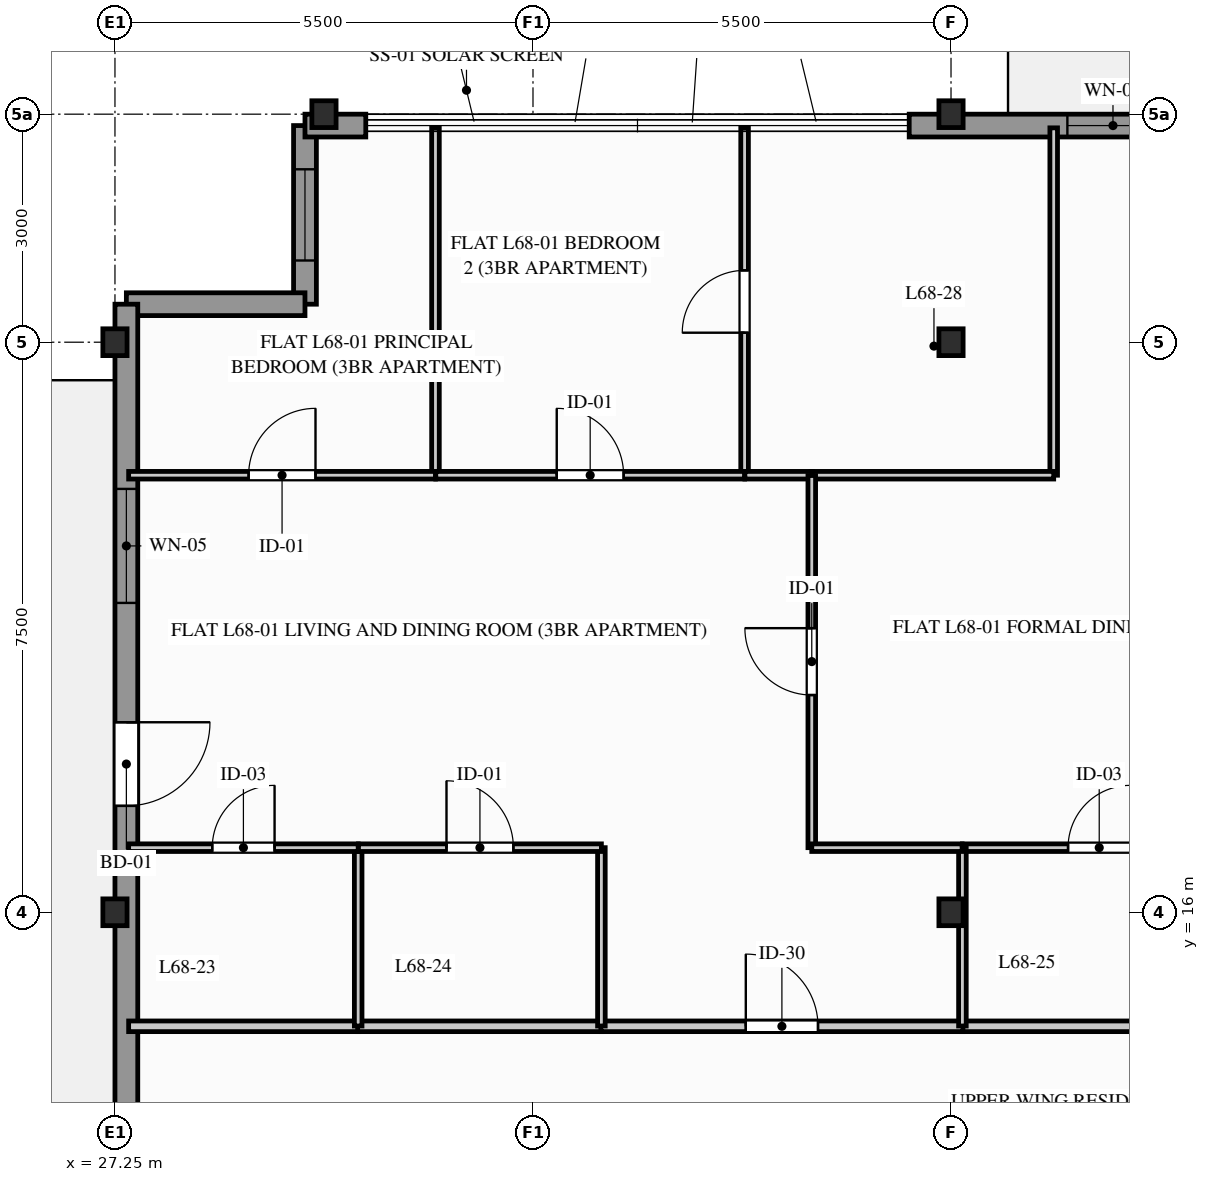
"""IFC4 building model, lengths in metres.
Left out: names, types, materials, properties, quantities, classifications, styles, units other than length and angle.
Written with IfcOpenShell. Run it as: python <this file> out.ifc"""

import sys

from ifc_helpers import new_model, si_unit, direction, frame, frame_2d, origin, origin_2d, place, context, subcontext, project, spatial, rectangle, i_section, extrude, element, fill, save


model = new_model("IFC4")
c1 = context("Model", 3, precision=1e-05, world=origin(), true_north=direction((0.0, 1.0)))
c2 = subcontext(c1, "Body", "Model", "MODEL_VIEW")
j1 = project(units=[si_unit("LENGTHUNIT", "METRE"), si_unit("PLANEANGLEUNIT", "RADIAN")], contexts=[c1])
p1 = place(None, origin())
s1 = spatial("IfcSite", under=j1, at=p1, CompositionType="ELEMENT")
p2 = place(p1, origin())
s2 = spatial("IfcBuilding", under=s1, at=p2, CompositionType="ELEMENT")
p3 = place(p2, frame((0.0, 0.0, 224.2)))
s3 = spatial("IfcBuildingStorey", under=s2, at=p3, CompositionType="ELEMENT", Elevation=224.2)
for number, where, z_axis, x_axis in (
    (1, (27.25, 16.0, 0.0), (0.0, 0.0, 1.0), (1.0, 0.0, 0.0)),
    (2, (27.25, 23.5, 0.0), (0.0, 0.0, 1.0), (1.0, 0.0, 0.0)),
    (3, (30.0, 26.5, 0.0), (0.0, 0.0, 1.0), (1.0, 0.0, 0.0)),
    (4, (38.25, 16.0, 0.0), (0.0, 0.0, 1.0), (1.0, 0.0, 0.0)),
    (5, (38.25, 23.5, 0.0), (0.0, 0.0, 1.0), (1.0, 0.0, 0.0)),
    (6, (38.25, 26.5, 0.0), (0.0, 0.0, 1.0), (1.0, 0.0, 0.0)),
):
    element("IfcColumn", number, at=place(p3, frame(where, z_axis=z_axis, x_axis=x_axis)), inside=s3, PredefinedType="COLUMN", context=c2, shape_type="SweptSolid", body=[
        extrude(i_section(OverallWidth=0.318, OverallDepth=0.353, WebThickness=0.023, FlangeThickness=0.038, FilletRadius=0.015, at=origin_2d()), origin(), (0.0, 0.0, 1.0), 3.1),
    ])
p4 = place(p3, frame((29.75, 26.35, 0.0), z_axis=(0.0, 0.0, 1.0), x_axis=(0.0, -1.0, 0.0)))
e7 = element("IfcWall", 7, at=p4, inside=s3, PredefinedType="STANDARD", context=c2, shape_type="SweptSolid", body=[
    extrude(rectangle(XDim=2.35, YDim=0.3, at=frame_2d((1.175, 0.0))), origin(), (0.0, 0.0, 1.0), 2.89),
])
p5 = place(p4, frame((0.575, 0.0, 0.95)))
e8 = element("IfcOpeningElement", 8, at=p5, cuts=e7, PredefinedType="OPENING", context=c2, shape_type="SweptSolid", body=[
    extrude(rectangle(XDim=1.2, YDim=1.6, at=frame_2d((0.6, 0.8))), frame((0.0, 0.16, 0.0), z_axis=(0.0, -1.0, 0.0), x_axis=(1.0, 0.0, 0.0)), (0.0, 0.0, 1.0), 0.32),
])
p6 = place(p3, frame((29.75, 24.0, 0.0), z_axis=(0.0, 0.0, 1.0), x_axis=(-1.0, 0.0, 0.0)))
e9 = element("IfcWall", 9, at=p6, inside=s3, PredefinedType="STANDARD", context=c2, shape_type="SweptSolid", body=[
    extrude(rectangle(XDim=2.35, YDim=0.3, at=frame_2d((1.175, 0.0))), origin(), (0.0, 0.0, 1.0), 2.89),
])
p7 = place(p3, frame((29.75, 26.35, 0.0), z_axis=(0.0, 0.0, 1.0), x_axis=(1.0, 0.0, 0.0)))
e10 = element("IfcWall", 10, at=p7, inside=s3, PredefinedType="STANDARD", context=c2, shape_type="SweptSolid", body=[
    extrude(rectangle(XDim=0.8, YDim=0.3, at=frame_2d((0.4, 0.0))), origin(), (0.0, 0.0, 1.0), 2.89),
])
p8 = place(p3, frame((37.7, 26.35, 0.0), z_axis=(0.0, 0.0, 1.0), x_axis=(1.0, 0.0, 0.0)))
e11 = element("IfcWall", 11, at=p8, inside=s3, PredefinedType="STANDARD", context=c2, shape_type="SweptSolid", body=[
    extrude(rectangle(XDim=10.85, YDim=0.3, at=frame_2d((5.425, 0.0))), origin(), (0.0, 0.0, 1.0), 2.332),
])
p9 = place(p8, frame((5.475, 0.0, 0.0)))
e12 = element("IfcOpeningElement", 12, at=p9, cuts=e11, PredefinedType="OPENING", context=c2, shape_type="SweptSolid", body=[
    extrude(rectangle(XDim=1.25, YDim=2.2, at=frame_2d((0.625, 1.1))), frame((0.0, 0.16, 0.0), z_axis=(0.0, -1.0, 0.0), x_axis=(1.0, 0.0, 0.0)), (0.0, 0.0, 1.0), 0.32),
])
p10 = place(p8, frame((2.081, 0.0, 0.512)))
e13 = element("IfcOpeningElement", 13, at=p10, cuts=e11, PredefinedType="OPENING", context=c2, shape_type="SweptSolid", body=[
    extrude(rectangle(XDim=1.2, YDim=1.6, at=frame_2d((0.6, 0.8))), frame((0.0, 0.16, 0.0), z_axis=(0.0, -1.0, 0.0), x_axis=(1.0, 0.0, 0.0)), (0.0, 0.0, 1.0), 0.32),
])
p11 = place(p3, frame((27.4, 24.0, 0.0), z_axis=(0.0, 0.0, 1.0), x_axis=(0.0, -1.0, 0.0)))
e14 = element("IfcWall", 14, at=p11, inside=s3, PredefinedType="STANDARD", context=c2, shape_type="SweptSolid", body=[
    extrude(rectangle(XDim=21.5, YDim=0.3, at=frame_2d((10.75, 0.0))), origin(), (0.0, 0.0, 1.0), 2.332),
])
p12 = place(p11, frame((5.5, 0.0, 0.0)))
e15 = element("IfcOpeningElement", 15, at=p12, cuts=e14, PredefinedType="OPENING", context=c2, shape_type="SweptSolid", body=[
    extrude(rectangle(XDim=1.1, YDim=2.2, at=frame_2d((0.55, 1.1))), frame((0.0, 0.16, 0.0), z_axis=(0.0, -1.0, 0.0), x_axis=(1.0, 0.0, 0.0)), (0.0, 0.0, 1.0), 0.32),
])
p13 = place(p11, frame((2.43, 0.0, 0.312)))
e16 = element("IfcOpeningElement", 16, at=p13, cuts=e14, PredefinedType="OPENING", context=c2, shape_type="SweptSolid", body=[
    extrude(rectangle(XDim=1.5, YDim=1.8, at=frame_2d((0.75, 0.9))), frame((0.0, 0.16, 0.0), z_axis=(0.0, -1.0, 0.0), x_axis=(1.0, 0.0, 0.0)), (0.0, 0.0, 1.0), 0.32),
])
p14 = place(p3, frame((27.43, 14.5, 0.0), z_axis=(0.0, 0.0, 1.0), x_axis=(1.0, 0.0, 0.0)))
e17 = element("IfcWall", 17, at=p14, inside=s3, PredefinedType="PARTITIONING", context=c2, shape_type="SweptSolid", body=[
    extrude(rectangle(XDim=3.031, YDim=0.14, at=frame_2d((1.516, 0.0))), origin(), (0.0, 0.0, 1.0), 2.89),
])
p15 = place(p3, frame((30.443, 14.5, 0.0), z_axis=(0.0, 0.0, 1.0), x_axis=(1.0, 0.0, 0.0)))
e18 = element("IfcWall", 18, at=p15, inside=s3, PredefinedType="PARTITIONING", context=c2, shape_type="SweptSolid", body=[
    extrude(rectangle(XDim=3.219, YDim=0.14, at=frame_2d((1.609, 0.0))), origin(), (0.0, 0.0, 1.0), 2.89),
])
p16 = place(p3, frame((38.389, 14.5, 0.0), z_axis=(0.0, 0.0, 1.0), x_axis=(1.0, 0.0, 0.0)))
e19 = element("IfcWall", 19, at=p16, inside=s3, PredefinedType="PARTITIONING", context=c2, shape_type="SweptSolid", body=[
    extrude(rectangle(XDim=3.623, YDim=0.14, at=frame_2d((1.811, 0.0))), origin(), (0.0, 0.0, 1.0), 2.325),
])
p17 = place(p3, frame((33.643, 14.5, 0.0), z_axis=(0.0, 0.0, 1.0), x_axis=(1.0, 0.0, 0.0)))
e20 = element("IfcWall", 20, at=p17, inside=s3, PredefinedType="PARTITIONING", context=c2, shape_type="SweptSolid", body=[
    extrude(rectangle(XDim=4.765, YDim=0.14, at=frame_2d((2.382, 0.0))), origin(), (0.0, 0.0, 1.0), 2.325),
])
p18 = place(p17, frame((1.907, 0.0, 0.0)))
e21 = element("IfcOpeningElement", 21, at=p18, cuts=e20, PredefinedType="OPENING", context=c2, shape_type="SweptSolid", body=[
    extrude(rectangle(XDim=0.95, YDim=2.05, at=frame_2d((0.475, 1.025))), frame((0.0, 0.08, 0.0), z_axis=(0.0, -1.0, 0.0), x_axis=(1.0, 0.0, 0.0)), (0.0, 0.0, 1.0), 0.16),
])
p19 = place(p3, frame((30.45, 14.504, 0.0), z_axis=(0.0, 0.0, 1.0), x_axis=(0.0, 1.0, 0.0)))
e22 = element("IfcWall", 22, at=p19, inside=s3, PredefinedType="PARTITIONING", context=c2, shape_type="SweptSolid", body=[
    extrude(rectangle(XDim=2.346, YDim=0.1, at=frame_2d((1.173, 0.0))), origin(), (0.0, 0.0, 1.0), 2.325),
])
p20 = place(p3, frame((27.43, 16.85, 0.0), z_axis=(0.0, 0.0, 1.0), x_axis=(1.0, 0.0, 0.0)))
e23 = element("IfcWall", 23, at=p20, inside=s3, PredefinedType="PARTITIONING", context=c2, shape_type="SweptSolid", body=[
    extrude(rectangle(XDim=3.02, YDim=0.1, at=frame_2d((1.51, 0.0))), origin(), (0.0, 0.0, 1.0), 2.89),
])
p21 = place(p20, frame((1.1, 0.0, 0.0)))
e24 = element("IfcOpeningElement", 24, at=p21, cuts=e23, PredefinedType="OPENING", context=c2, shape_type="SweptSolid", body=[
    extrude(rectangle(XDim=0.82, YDim=2.02, at=frame_2d((0.41, 1.01))), frame((0.0, 0.06, 0.0), z_axis=(0.0, -1.0, 0.0), x_axis=(1.0, 0.0, 0.0)), (0.0, 0.0, 1.0), 0.12),
])
p22 = place(p3, frame((33.65, 14.504, 0.0), z_axis=(0.0, 0.0, 1.0), x_axis=(0.0, 1.0, 0.0)))
e25 = element("IfcWall", 25, at=p22, inside=s3, PredefinedType="PARTITIONING", context=c2, shape_type="SweptSolid", body=[
    extrude(rectangle(XDim=2.346, YDim=0.1, at=frame_2d((1.173, 0.0))), origin(), (0.0, 0.0, 1.0), 2.325),
])
p23 = place(p3, frame((30.454, 16.85, 0.0), z_axis=(0.0, 0.0, 1.0), x_axis=(1.0, 0.0, 0.0)))
e26 = element("IfcWall", 26, at=p23, inside=s3, PredefinedType="PARTITIONING", context=c2, shape_type="SweptSolid", body=[
    extrude(rectangle(XDim=3.196, YDim=0.1, at=frame_2d((1.598, 0.0))), origin(), (0.0, 0.0, 1.0), 2.89),
])
p24 = place(p23, frame((1.158, 0.0, 0.0)))
e27 = element("IfcOpeningElement", 27, at=p24, cuts=e26, PredefinedType="OPENING", context=c2, shape_type="SweptSolid", body=[
    extrude(rectangle(XDim=0.88, YDim=2.04, at=frame_2d((0.44, 1.02))), frame((0.0, 0.06, 0.0), z_axis=(0.0, -1.0, 0.0), x_axis=(1.0, 0.0, 0.0)), (0.0, 0.0, 1.0), 0.12),
])
p25 = place(p3, frame((38.4, 16.85, 0.0), z_axis=(0.0, 0.0, 1.0), x_axis=(1.0, 0.0, 0.0)))
e28 = element("IfcWall", 28, at=p25, inside=s3, PredefinedType="PARTITIONING", context=c2, shape_type="SweptSolid", body=[
    extrude(rectangle(XDim=3.6, YDim=0.1, at=frame_2d((1.8, 0.0))), origin(), (0.0, 0.0, 1.0), 2.325),
])
p26 = place(p25, frame((1.39, 0.0, 0.0)))
e29 = element("IfcOpeningElement", 29, at=p26, cuts=e28, PredefinedType="OPENING", context=c2, shape_type="SweptSolid", body=[
    extrude(rectangle(XDim=0.82, YDim=2.02, at=frame_2d((0.41, 1.01))), frame((0.0, 0.06, 0.0), z_axis=(0.0, -1.0, 0.0), x_axis=(1.0, 0.0, 0.0)), (0.0, 0.0, 1.0), 0.12),
])
p27 = place(p3, frame((38.4, 14.504, 0.0), z_axis=(0.0, 0.0, 1.0), x_axis=(0.0, 1.0, 0.0)))
e30 = element("IfcWall", 30, at=p27, inside=s3, PredefinedType="PARTITIONING", context=c2, shape_type="SweptSolid", body=[
    extrude(rectangle(XDim=2.346, YDim=0.1, at=frame_2d((1.173, 0.0))), origin(), (0.0, 0.0, 1.0), 2.325),
])
p28 = place(p3, frame((31.467, 21.75, 0.0), z_axis=(0.0, 0.0, 1.0), x_axis=(0.0, 1.0, 0.0)))
e31 = element("IfcWall", 31, at=p28, inside=s3, PredefinedType="PARTITIONING", context=c2, shape_type="SweptSolid", body=[
    extrude(rectangle(XDim=4.57, YDim=0.1, at=frame_2d((2.285, 0.0))), origin(), (0.0, 0.0, 1.0), 2.325),
])
p29 = place(p3, frame((27.43, 21.75, 0.0), z_axis=(0.0, 0.0, 1.0), x_axis=(1.0, 0.0, 0.0)))
e32 = element("IfcWall", 32, at=p29, inside=s3, PredefinedType="PARTITIONING", context=c2, shape_type="SweptSolid", body=[
    extrude(rectangle(XDim=4.037, YDim=0.1, at=frame_2d((2.019, 0.0))), origin(), (0.0, 0.0, 1.0), 2.89),
])
p30 = place(p29, frame((1.579, 0.0, 0.0)))
e33 = element("IfcOpeningElement", 33, at=p30, cuts=e32, PredefinedType="OPENING", context=c2, shape_type="SweptSolid", body=[
    extrude(rectangle(XDim=0.88, YDim=2.04, at=frame_2d((0.44, 1.02))), frame((0.0, 0.06, 0.0), z_axis=(0.0, -1.0, 0.0), x_axis=(1.0, 0.0, 0.0)), (0.0, 0.0, 1.0), 0.12),
])
p31 = place(p3, frame((35.534, 21.75, 0.0), z_axis=(0.0, 0.0, 1.0), x_axis=(0.0, 1.0, 0.0)))
e34 = element("IfcWall", 34, at=p31, inside=s3, PredefinedType="PARTITIONING", context=c2, shape_type="SweptSolid", body=[
    extrude(rectangle(XDim=4.57, YDim=0.1, at=frame_2d((2.285, 0.0))), origin(), (0.0, 0.0, 1.0), 2.325),
])
p32 = place(p31, frame((1.875, 0.0, 0.0)))
e35 = element("IfcOpeningElement", 35, at=p32, cuts=e34, PredefinedType="OPENING", context=c2, shape_type="SweptSolid", body=[
    extrude(rectangle(XDim=0.82, YDim=2.02, at=frame_2d((0.41, 1.01))), frame((0.0, 0.06, 0.0), z_axis=(0.0, -1.0, 0.0), x_axis=(1.0, 0.0, 0.0)), (0.0, 0.0, 1.0), 0.12),
])
p33 = place(p3, frame((31.471, 21.75, 0.0), z_axis=(0.0, 0.0, 1.0), x_axis=(1.0, 0.0, 0.0)))
e36 = element("IfcWall", 36, at=p33, inside=s3, PredefinedType="PARTITIONING", context=c2, shape_type="SweptSolid", body=[
    extrude(rectangle(XDim=4.063, YDim=0.1, at=frame_2d((2.031, 0.0))), origin(), (0.0, 0.0, 1.0), 2.89),
])
p34 = place(p33, frame((1.592, 0.0, 0.0)))
e37 = element("IfcOpeningElement", 37, at=p34, cuts=e36, PredefinedType="OPENING", context=c2, shape_type="SweptSolid", body=[
    extrude(rectangle(XDim=0.88, YDim=2.04, at=frame_2d((0.44, 1.02))), frame((0.0, 0.06, 0.0), z_axis=(0.0, -1.0, 0.0), x_axis=(1.0, 0.0, 0.0)), (0.0, 0.0, 1.0), 0.12),
])
p35 = place(p3, frame((39.601, 21.75, 0.0), z_axis=(0.0, 0.0, 1.0), x_axis=(0.0, 1.0, 0.0)))
e38 = element("IfcWall", 38, at=p35, inside=s3, PredefinedType="PARTITIONING", context=c2, shape_type="SweptSolid", body=[
    extrude(rectangle(XDim=4.57, YDim=0.1, at=frame_2d((2.285, 0.0))), origin(), (0.0, 0.0, 1.0), 2.325),
])
p36 = place(p3, frame((36.407, 21.75, 0.0), z_axis=(0.0, 0.0, 1.0), x_axis=(1.0, 0.0, 0.0)))
e39 = element("IfcWall", 39, at=p36, inside=s3, PredefinedType="PARTITIONING", context=c2, shape_type="SweptSolid", body=[
    extrude(rectangle(XDim=3.194, YDim=0.1, at=frame_2d((1.597, 0.0))), origin(), (0.0, 0.0, 1.0), 2.325),
])
p37 = place(p3, frame((35.538, 21.75, 0.0), z_axis=(0.0, 0.0, 1.0), x_axis=(1.0, 0.0, 0.0)))
e40 = element("IfcWall", 40, at=p37, inside=s3, PredefinedType="PARTITIONING", context=c2, shape_type="SweptSolid", body=[
    extrude(rectangle(XDim=0.887, YDim=0.1, at=frame_2d((0.444, 0.0))), origin(), (0.0, 0.0, 1.0), 2.89),
])
p38 = place(p3, frame((36.418, 16.85, 0.0), z_axis=(0.0, 0.0, 1.0), x_axis=(0.0, 1.0, 0.0)))
e41 = element("IfcWall", 41, at=p38, inside=s3, PredefinedType="PARTITIONING", context=c2, shape_type="SweptSolid", body=[
    extrude(rectangle(XDim=4.896, YDim=0.1, at=frame_2d((2.448, 0.0))), origin(), (0.0, 0.0, 1.0), 2.614),
])
p39 = place(p38, frame((2.008, 0.0, 0.0)))
e42 = element("IfcOpeningElement", 42, at=p39, cuts=e41, PredefinedType="OPENING", context=c2, shape_type="SweptSolid", body=[
    extrude(rectangle(XDim=0.88, YDim=2.04, at=frame_2d((0.44, 1.02))), frame((0.0, 0.06, 0.0), z_axis=(0.0, -1.0, 0.0), x_axis=(1.0, 0.0, 0.0)), (0.0, 0.0, 1.0), 0.12),
])
p40 = place(p3, frame((36.418, 16.85, 0.0), z_axis=(0.0, 0.0, 1.0), x_axis=(1.0, 0.0, 0.0)))
e43 = element("IfcWall", 43, at=p40, inside=s3, PredefinedType="PARTITIONING", context=c2, shape_type="SweptSolid", body=[
    extrude(rectangle(XDim=1.978, YDim=0.1, at=frame_2d((0.989, 0.0))), origin(), (0.0, 0.0, 1.0), 2.325),
])
p41 = place(p10, origin())
e44 = element("IfcWindow", 44, at=p41, inside=s3, PartitioningType="SINGLE_PANEL", PredefinedType="WINDOW", context=c2, shape_type="SweptSolid", body=[
    extrude(rectangle(XDim=1.2, YDim=1.6, at=frame_2d((0.6, 0.8))), frame((0.0, 0.03, 0.0), z_axis=(0.0, -1.0, 0.0), x_axis=(1.0, 0.0, 0.0)), (0.0, 0.0, 1.0), 0.06),
])
fill(e13, e44)
p42 = place(p12, origin())
e45 = element("IfcDoor", 45, at=p42, inside=s3, OperationType="SINGLE_SWING_LEFT", PredefinedType="DOOR", context=c2, shape_type="SweptSolid", body=[
    extrude(rectangle(XDim=1.1, YDim=2.2, at=frame_2d((0.55, 1.1))), frame((0.0, 0.025, 0.0), z_axis=(0.0, -1.0, 0.0), x_axis=(1.0, 0.0, 0.0)), (0.0, 0.0, 1.0), 0.05),
])
fill(e15, e45)
p43 = place(p13, origin())
e46 = element("IfcWindow", 46, at=p43, inside=s3, PartitioningType="SINGLE_PANEL", PredefinedType="WINDOW", context=c2, shape_type="SweptSolid", body=[
    extrude(rectangle(XDim=1.5, YDim=1.8, at=frame_2d((0.75, 0.9))), frame((0.0, 0.03, 0.0), z_axis=(0.0, -1.0, 0.0), x_axis=(1.0, 0.0, 0.0)), (0.0, 0.0, 1.0), 0.06),
])
fill(e16, e46)
p44 = place(p18, origin())
e47 = element("IfcDoor", 47, at=p44, inside=s3, OperationType="SINGLE_SWING_LEFT", PredefinedType="DOOR", context=c2, shape_type="SweptSolid", body=[
    extrude(rectangle(XDim=0.95, YDim=2.05, at=frame_2d((0.475, 1.025))), frame((0.0, 0.025, 0.0), z_axis=(0.0, -1.0, 0.0), x_axis=(1.0, 0.0, 0.0)), (0.0, 0.0, 1.0), 0.05),
])
fill(e21, e47)
p45 = place(p21, origin())
e48 = element("IfcDoor", 48, at=p45, inside=s3, OperationType="SINGLE_SWING_RIGHT", PredefinedType="DOOR", context=c2, shape_type="SweptSolid", body=[
    extrude(rectangle(XDim=0.82, YDim=2.02, at=frame_2d((0.41, 1.01))), frame((0.0, 0.025, 0.0), z_axis=(0.0, -1.0, 0.0), x_axis=(1.0, 0.0, 0.0)), (0.0, 0.0, 1.0), 0.05),
])
fill(e24, e48)
p46 = place(p24, origin())
e49 = element("IfcDoor", 49, at=p46, inside=s3, OperationType="SINGLE_SWING_LEFT", PredefinedType="DOOR", context=c2, shape_type="SweptSolid", body=[
    extrude(rectangle(XDim=0.88, YDim=2.04, at=frame_2d((0.44, 1.02))), frame((0.0, 0.025, 0.0), z_axis=(0.0, -1.0, 0.0), x_axis=(1.0, 0.0, 0.0)), (0.0, 0.0, 1.0), 0.05),
])
fill(e27, e49)
p47 = place(p30, origin())
e50 = element("IfcDoor", 50, at=p47, inside=s3, OperationType="SINGLE_SWING_RIGHT", PredefinedType="DOOR", context=c2, shape_type="SweptSolid", body=[
    extrude(rectangle(XDim=0.88, YDim=2.04, at=frame_2d((0.44, 1.02))), frame((0.0, 0.025, 0.0), z_axis=(0.0, -1.0, 0.0), x_axis=(1.0, 0.0, 0.0)), (0.0, 0.0, 1.0), 0.05),
])
fill(e33, e50)
p48 = place(p34, origin())
e51 = element("IfcDoor", 51, at=p48, inside=s3, OperationType="SINGLE_SWING_LEFT", PredefinedType="DOOR", context=c2, shape_type="SweptSolid", body=[
    extrude(rectangle(XDim=0.88, YDim=2.04, at=frame_2d((0.44, 1.02))), frame((0.0, 0.025, 0.0), z_axis=(0.0, -1.0, 0.0), x_axis=(1.0, 0.0, 0.0)), (0.0, 0.0, 1.0), 0.05),
])
fill(e37, e51)
p49 = place(p39, origin())
e52 = element("IfcDoor", 52, at=p49, inside=s3, OperationType="SINGLE_SWING_RIGHT", PredefinedType="DOOR", context=c2, shape_type="SweptSolid", body=[
    extrude(rectangle(XDim=0.88, YDim=2.04, at=frame_2d((0.44, 1.02))), frame((0.0, 0.025, 0.0), z_axis=(0.0, -1.0, 0.0), x_axis=(1.0, 0.0, 0.0)), (0.0, 0.0, 1.0), 0.05),
])
fill(e42, e52)
p50 = place(p26, origin())
e53 = element("IfcDoor", 53, at=p50, inside=s3, OperationType="SINGLE_SWING_RIGHT", PredefinedType="DOOR", context=c2, shape_type="SweptSolid", body=[
    extrude(rectangle(XDim=0.82, YDim=2.02, at=frame_2d((0.41, 1.01))), frame((0.0, 0.025, 0.0), z_axis=(0.0, -1.0, 0.0), x_axis=(1.0, 0.0, 0.0)), (0.0, 0.0, 1.0), 0.05),
])
fill(e29, e53)
p51 = place(p32, origin())
e54 = element("IfcDoor", 54, at=p51, inside=s3, OperationType="SINGLE_SWING_LEFT", PredefinedType="DOOR", context=c2, shape_type="SweptSolid", body=[
    extrude(rectangle(XDim=0.82, YDim=2.02, at=frame_2d((0.41, 1.01))), frame((0.0, 0.025, 0.0), z_axis=(0.0, -1.0, 0.0), x_axis=(1.0, 0.0, 0.0)), (0.0, 0.0, 1.0), 0.05),
])
fill(e35, e54)
p52 = place(p5, origin())
e55 = element("IfcWindow", 55, at=p52, inside=s3, PartitioningType="SINGLE_PANEL", PredefinedType="WINDOW", context=c2, shape_type="SweptSolid", body=[
    extrude(rectangle(XDim=1.2, YDim=1.6, at=frame_2d((0.6, 0.8))), frame((0.0, 0.03, 0.0), z_axis=(0.0, -1.0, 0.0), x_axis=(1.0, 0.0, 0.0)), (0.0, 0.0, 1.0), 0.06),
])
fill(e8, e55)
save(model, sys.argv[1])
